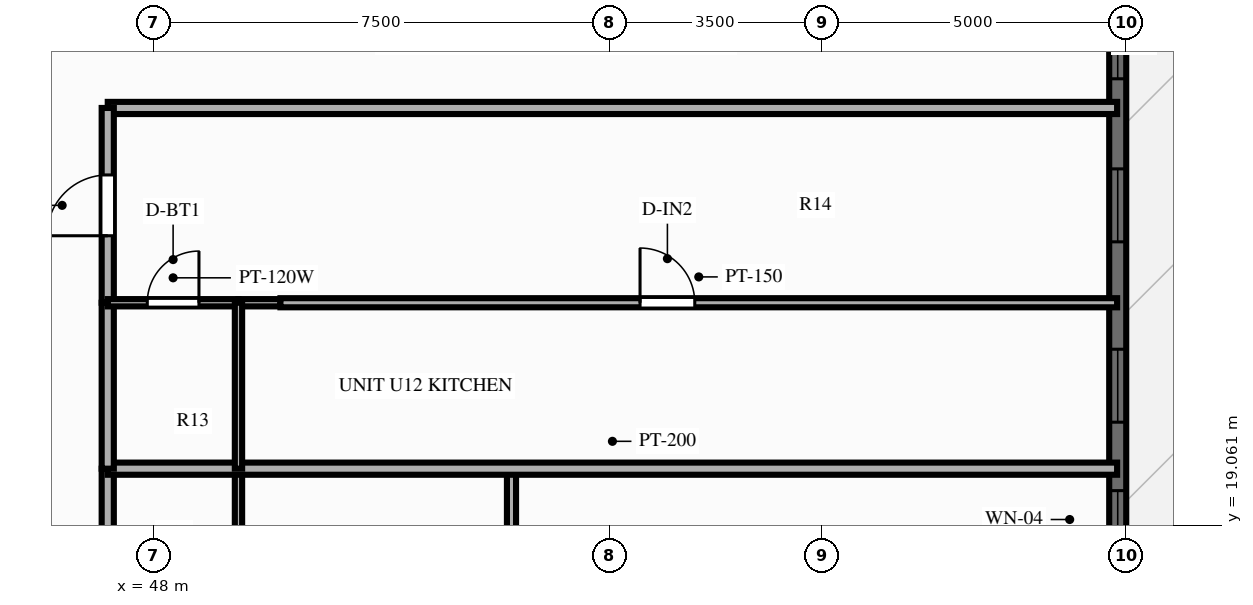
"""IFC4 building model, lengths in metres.
Left out: names, types, materials, properties, quantities, classifications, styles, units other than length and angle.
Written with IfcOpenShell. Run it as: python <this file> out.ifc"""

import sys

from ifc_helpers import new_model, si_unit, direction, frame, frame_2d, origin, place, context, subcontext, project, spatial, rectangle, extrude, source, transform, mapped, element, fill, save


model = new_model("IFC4")
c1 = context("Model", 3, precision=1e-05, world=origin(), true_north=direction((0.0, 1.0)))
c2 = subcontext(c1, "Body", "Model", "MODEL_VIEW")
j1 = project(units=[si_unit("LENGTHUNIT", "METRE"), si_unit("PLANEANGLEUNIT", "RADIAN")], contexts=[c1])
p1 = place(None, origin())
s1 = spatial("IfcSite", under=j1, at=p1, CompositionType="ELEMENT")
p2 = place(p1, origin())
s2 = spatial("IfcBuilding", under=s1, at=p2, CompositionType="ELEMENT")
p3 = place(p2, frame((0.0, 0.0, 113.85)))
s3 = spatial("IfcBuildingStorey", under=s2, at=p3, CompositionType="ELEMENT", Elevation=113.85)
p4 = place(p3, frame((63.86, 7.2, 0.0), z_axis=(0.0, 0.0, 1.0), x_axis=(0.0, 1.0, 0.0)))
e1 = element("IfcWall", 1, at=p4, inside=s3, PredefinedType="SOLIDWALL", context=c2, shape_type="SweptSolid", body=[
    extrude(rectangle(XDim=39.6, YDim=0.28, at=frame_2d((19.8, 0.0))), origin(), (0.0, 0.0, 1.0), 2.28),
])
p5 = place(p4, frame((1.56, 0.0, 0.25)))
e2 = element("IfcOpeningElement", 2, at=p5, cuts=e1, PredefinedType="OPENING", context=c2, shape_type="SweptSolid", body=[
    extrude(rectangle(XDim=1.2, YDim=1.5, at=frame_2d((0.6, 0.75))), frame((0.0, 0.152, 0.0), z_axis=(0.0, -1.0, 0.0), x_axis=(1.0, 0.0, 0.0)), (0.0, 0.0, 1.0), 0.304),
])
p6 = place(p4, frame((4.829, 0.0, 0.25)))
e3 = element("IfcOpeningElement", 3, at=p6, cuts=e1, PredefinedType="OPENING", context=c2, shape_type="SweptSolid", body=[
    extrude(rectangle(XDim=1.2, YDim=1.5, at=frame_2d((0.6, 0.75))), frame((0.0, 0.152, 0.0), z_axis=(0.0, -1.0, 0.0), x_axis=(1.0, 0.0, 0.0)), (0.0, 0.0, 1.0), 0.304),
])
p7 = place(p4, frame((7.567, 0.0, 0.25)))
e4 = element("IfcOpeningElement", 4, at=p7, cuts=e1, PredefinedType="OPENING", context=c2, shape_type="SweptSolid", body=[
    extrude(rectangle(XDim=1.2, YDim=1.5, at=frame_2d((0.6, 0.75))), frame((0.0, 0.152, 0.0), z_axis=(0.0, -1.0, 0.0), x_axis=(1.0, 0.0, 0.0)), (0.0, 0.0, 1.0), 0.304),
])
p8 = place(p4, frame((11.476, 0.0, 0.25)))
e5 = element("IfcOpeningElement", 5, at=p8, cuts=e1, PredefinedType="OPENING", context=c2, shape_type="SweptSolid", body=[
    extrude(rectangle(XDim=0.95, YDim=1.5, at=frame_2d((0.475, 0.75))), frame((0.0, 0.152, 0.0), z_axis=(0.0, -1.0, 0.0), x_axis=(1.0, 0.0, 0.0)), (0.0, 0.0, 1.0), 0.304),
])
p9 = place(p4, frame((13.552, 0.0, 0.25)))
e6 = element("IfcOpeningElement", 6, at=p9, cuts=e1, PredefinedType="OPENING", context=c2, shape_type="SweptSolid", body=[
    extrude(rectangle(XDim=1.2, YDim=1.5, at=frame_2d((0.6, 0.75))), frame((0.0, 0.152, 0.0), z_axis=(0.0, -1.0, 0.0), x_axis=(1.0, 0.0, 0.0)), (0.0, 0.0, 1.0), 0.304),
])
p10 = place(p4, frame((16.518, 0.0, 0.25)))
e7 = element("IfcOpeningElement", 7, at=p10, cuts=e1, PredefinedType="OPENING", context=c2, shape_type="SweptSolid", body=[
    extrude(rectangle(XDim=1.2, YDim=1.5, at=frame_2d((0.6, 0.75))), frame((0.0, 0.152, 0.0), z_axis=(0.0, -1.0, 0.0), x_axis=(1.0, 0.0, 0.0)), (0.0, 0.0, 1.0), 0.304),
])
p11 = place(p4, frame((19.2, 0.0, 0.25)))
e8 = element("IfcOpeningElement", 8, at=p11, cuts=e1, PredefinedType="OPENING", context=c2, shape_type="SweptSolid", body=[
    extrude(rectangle(XDim=1.2, YDim=1.5, at=frame_2d((0.6, 0.75))), frame((0.0, 0.152, 0.0), z_axis=(0.0, -1.0, 0.0), x_axis=(1.0, 0.0, 0.0)), (0.0, 0.0, 1.0), 0.304),
])
p12 = place(p4, frame((21.578, 0.0, 0.25)))
e9 = element("IfcOpeningElement", 9, at=p12, cuts=e1, PredefinedType="OPENING", context=c2, shape_type="SweptSolid", body=[
    extrude(rectangle(XDim=1.2, YDim=1.5, at=frame_2d((0.6, 0.75))), frame((0.0, 0.152, 0.0), z_axis=(0.0, -1.0, 0.0), x_axis=(1.0, 0.0, 0.0)), (0.0, 0.0, 1.0), 0.304),
])
p13 = place(p4, frame((26.313, 0.0, 0.0), z_axis=(0.0, 0.0, 1.0), x_axis=(-1.0, 0.0, 0.0)))
e10 = element("IfcOpeningElement", 10, at=p13, cuts=e1, PredefinedType="OPENING", context=c2, shape_type="SweptSolid", body=[
    extrude(rectangle(XDim=1.6, YDim=2.15, at=frame_2d((0.8, 1.075))), frame((0.0, 0.152, 0.0), z_axis=(0.0, -1.0, 0.0), x_axis=(1.0, 0.0, 0.0)), (0.0, 0.0, 1.0), 0.304),
])
p14 = place(p4, frame((29.305, 0.0, 0.25)))
e11 = element("IfcOpeningElement", 11, at=p14, cuts=e1, PredefinedType="OPENING", context=c2, shape_type="SweptSolid", body=[
    extrude(rectangle(XDim=0.7, YDim=1.5, at=frame_2d((0.35, 0.75))), frame((0.0, 0.152, 0.0), z_axis=(0.0, -1.0, 0.0), x_axis=(1.0, 0.0, 0.0)), (0.0, 0.0, 1.0), 0.304),
])
p15 = place(p4, frame((30.848, 0.0, 0.25)))
e12 = element("IfcOpeningElement", 12, at=p15, cuts=e1, PredefinedType="OPENING", context=c2, shape_type="SweptSolid", body=[
    extrude(rectangle(XDim=1.2, YDim=1.5, at=frame_2d((0.6, 0.75))), frame((0.0, 0.152, 0.0), z_axis=(0.0, -1.0, 0.0), x_axis=(1.0, 0.0, 0.0)), (0.0, 0.0, 1.0), 0.304),
])
p16 = place(p4, frame((34.183, 0.0, 0.25)))
e13 = element("IfcOpeningElement", 13, at=p16, cuts=e1, PredefinedType="OPENING", context=c2, shape_type="SweptSolid", body=[
    extrude(rectangle(XDim=1.2, YDim=1.5, at=frame_2d((0.6, 0.75))), frame((0.0, 0.152, 0.0), z_axis=(0.0, -1.0, 0.0), x_axis=(1.0, 0.0, 0.0)), (0.0, 0.0, 1.0), 0.304),
])
p17 = place(p4, frame((37.452, 0.0, 0.25)))
e14 = element("IfcOpeningElement", 14, at=p17, cuts=e1, PredefinedType="OPENING", context=c2, shape_type="SweptSolid", body=[
    extrude(rectangle(XDim=1.2, YDim=1.5, at=frame_2d((0.6, 0.75))), frame((0.0, 0.152, 0.0), z_axis=(0.0, -1.0, 0.0), x_axis=(1.0, 0.0, 0.0)), (0.0, 0.0, 1.0), 0.304),
])
p18 = place(p3, frame((47.25, 25.92, 0.0), z_axis=(0.0, 0.0, 1.0), x_axis=(1.0, 0.0, 0.0)))
e15 = element("IfcWall", 15, at=p18, inside=s3, PredefinedType="PARTITIONING", context=c2, shape_type="SweptSolid", body=[
    extrude(rectangle(XDim=16.6, YDim=0.2, at=frame_2d((8.3, 0.0))), origin(), (0.0, 0.0, 1.0), 2.79),
])
p19 = place(p3, frame((47.25, 16.68, 0.0), z_axis=(0.0, 0.0, 1.0), x_axis=(0.0, 1.0, 0.0)))
e16 = element("IfcWall", 16, at=p19, inside=s3, PredefinedType="PARTITIONING", context=c2, shape_type="SweptSolid", body=[
    extrude(rectangle(XDim=3.307, YDim=0.2, at=frame_2d((1.654, 0.0))), origin(), (0.0, 0.0, 1.0), 2.79),
])
p20 = place(p3, frame((49.4, 16.68, 0.0), z_axis=(0.0, 0.0, 1.0), x_axis=(0.0, 1.0, 0.0)))
e17 = element("IfcWall", 17, at=p20, inside=s3, PredefinedType="PARTITIONING", context=c2, shape_type="SweptSolid", body=[
    extrude(rectangle(XDim=3.307, YDim=0.12, at=frame_2d((1.654, 0.0))), origin(), (0.0, 0.0, 1.0), 2.79),
])
p21 = place(p3, frame((53.89, 16.68, 0.0), z_axis=(0.0, 0.0, 1.0), x_axis=(0.0, 1.0, 0.0)))
e18 = element("IfcWall", 18, at=p21, inside=s3, PredefinedType="PARTITIONING", context=c2, shape_type="SweptSolid", body=[
    extrude(rectangle(XDim=3.307, YDim=0.15, at=frame_2d((1.654, 0.0))), origin(), (0.0, 0.0, 1.0), 2.79),
])
p22 = place(p3, frame((47.25, 19.987, 0.0), z_axis=(0.0, 0.0, 1.0), x_axis=(1.0, 0.0, 0.0)))
e19 = element("IfcWall", 19, at=p22, inside=s3, PredefinedType="PARTITIONING", context=c2, shape_type="SweptSolid", body=[
    extrude(rectangle(XDim=16.6, YDim=0.2, at=frame_2d((8.3, 0.0))), origin(), (0.0, 0.0, 1.0), 2.79),
])
p23 = place(p3, frame((47.25, 19.987, 0.0), z_axis=(0.0, 0.0, 1.0), x_axis=(0.0, 1.0, 0.0)))
e20 = element("IfcWall", 20, at=p23, inside=s3, PredefinedType="PARTITIONING", context=c2, shape_type="SweptSolid", body=[
    extrude(rectangle(XDim=2.729, YDim=0.2, at=frame_2d((1.365, 0.0))), origin(), (0.0, 0.0, 1.0), 2.79),
])
p24 = place(p3, frame((47.25, 22.716, 0.0), z_axis=(0.0, 0.0, 1.0), x_axis=(0.0, 1.0, 0.0)))
e21 = element("IfcWall", 21, at=p24, inside=s3, PredefinedType="PARTITIONING", context=c2, shape_type="SweptSolid", body=[
    extrude(rectangle(XDim=3.204, YDim=0.2, at=frame_2d((1.602, 0.0))), origin(), (0.0, 0.0, 1.0), 2.79),
])
p25 = place(p24, frame((1.102, 0.0, 0.0)))
e22 = element("IfcOpeningElement", 22, at=p25, cuts=e21, PredefinedType="OPENING", context=c2, shape_type="SweptSolid", body=[
    extrude(rectangle(XDim=1.0, YDim=2.15, at=frame_2d((0.5, 1.075))), frame((0.0, 0.112, 0.0), z_axis=(0.0, -1.0, 0.0), x_axis=(1.0, 0.0, 0.0)), (0.0, 0.0, 1.0), 0.224),
])
p26 = place(p3, frame((47.25, 22.716, 0.0), z_axis=(0.0, 0.0, 1.0), x_axis=(1.0, 0.0, 0.0)))
e23 = element("IfcWall", 23, at=p26, inside=s3, PredefinedType="PARTITIONING", context=c2, shape_type="SweptSolid", body=[
    extrude(rectangle(XDim=2.15, YDim=0.12, at=frame_2d((1.075, 0.0))), origin(), (0.0, 0.0, 1.0), 2.79),
])
p27 = place(p26, frame((0.65, 0.0, 0.0)))
e24 = element("IfcOpeningElement", 24, at=p27, cuts=e23, PredefinedType="OPENING", context=c2, shape_type="SweptSolid", body=[
    extrude(rectangle(XDim=0.85, YDim=2.05, at=frame_2d((0.425, 1.025))), frame((0.0, 0.072, 0.0), z_axis=(0.0, -1.0, 0.0), x_axis=(1.0, 0.0, 0.0)), (0.0, 0.0, 1.0), 0.144),
])
p28 = place(p3, frame((49.4, 22.716, 0.0), z_axis=(0.0, 0.0, 1.0), x_axis=(1.0, 0.0, 0.0)))
e25 = element("IfcWall", 25, at=p28, inside=s3, PredefinedType="PARTITIONING", context=c2, shape_type="SweptSolid", body=[
    extrude(rectangle(XDim=0.69, YDim=0.12, at=frame_2d((0.345, 0.0))), origin(), (0.0, 0.0, 1.0), 2.79),
])
p29 = place(p3, frame((49.4, 19.987, 0.0), z_axis=(0.0, 0.0, 1.0), x_axis=(0.0, 1.0, 0.0)))
e26 = element("IfcWall", 26, at=p29, inside=s3, PredefinedType="PARTITIONING", context=c2, shape_type="SweptSolid", body=[
    extrude(rectangle(XDim=2.729, YDim=0.12, at=frame_2d((1.365, 0.0))), origin(), (0.0, 0.0, 1.0), 2.79),
])
p30 = place(p3, frame((50.09, 22.716, 0.0), z_axis=(0.0, 0.0, 1.0), x_axis=(1.0, 0.0, 0.0)))
e27 = element("IfcWall", 27, at=p30, inside=s3, PredefinedType="PARTITIONING", context=c2, shape_type="SweptSolid", body=[
    extrude(rectangle(XDim=13.76, YDim=0.15, at=frame_2d((6.88, 0.0))), origin(), (0.0, 0.0, 1.0), 2.79),
])
p31 = place(p30, frame((5.914, 0.0, 0.0)))
e28 = element("IfcOpeningElement", 28, at=p31, cuts=e27, PredefinedType="OPENING", context=c2, shape_type="SweptSolid", body=[
    extrude(rectangle(XDim=0.9, YDim=2.1, at=frame_2d((0.45, 1.05))), frame((0.0, 0.087, 0.0), z_axis=(0.0, -1.0, 0.0), x_axis=(1.0, 0.0, 0.0)), (0.0, 0.0, 1.0), 0.174),
])
m1 = source(origin(), c2, "Body", "SweptSolid", [
    extrude(rectangle(XDim=0.95, YDim=1.5, at=frame_2d((0.475, 0.75))), frame((0.0, 0.03, 0.0), z_axis=(0.0, -1.0, 0.0), x_axis=(1.0, 0.0, 0.0)), (0.0, 0.0, 1.0), 0.06),
])
p32 = place(p8, origin())
e29 = element("IfcWindow", 29, at=p32, inside=s3, PartitioningType="SINGLE_PANEL", PredefinedType="WINDOW", context=c2, shape_type="MappedRepresentation", body=[
    mapped(m1, transform((0.0, 0.0, 0.0), scale=1.0)),
])
fill(e5, e29)
m2 = source(origin(), c2, "Body", "SweptSolid", [
    extrude(rectangle(XDim=1.2, YDim=1.5, at=frame_2d((0.6, 0.75))), frame((0.0, 0.03, 0.0), z_axis=(0.0, -1.0, 0.0), x_axis=(1.0, 0.0, 0.0)), (0.0, 0.0, 1.0), 0.06),
])
p33 = place(p9, origin())
e30 = element("IfcWindow", 30, at=p33, inside=s3, PartitioningType="SINGLE_PANEL", PredefinedType="WINDOW", context=c2, shape_type="MappedRepresentation", body=[
    mapped(m2, transform((0.0, 0.0, 0.0), scale=1.0)),
])
fill(e6, e30)
p34 = place(p10, origin())
e31 = element("IfcWindow", 31, at=p34, inside=s3, PartitioningType="SINGLE_PANEL", PredefinedType="WINDOW", context=c2, shape_type="MappedRepresentation", body=[
    mapped(m2, transform((0.0, 0.0, 0.0), scale=1.0)),
])
fill(e7, e31)
p35 = place(p11, origin())
e32 = element("IfcWindow", 32, at=p35, inside=s3, PartitioningType="SINGLE_PANEL", PredefinedType="WINDOW", context=c2, shape_type="MappedRepresentation", body=[
    mapped(m2, transform((0.0, 0.0, 0.0), scale=1.0)),
])
fill(e8, e32)
m3 = source(origin(), c2, "Body", "SweptSolid", [
    extrude(rectangle(XDim=1.0, YDim=2.15, at=frame_2d((0.5, 1.075))), frame((0.0, 0.025, 0.0), z_axis=(0.0, -1.0, 0.0), x_axis=(1.0, 0.0, 0.0)), (0.0, 0.0, 1.0), 0.05),
])
p36 = place(p25, origin())
e33 = element("IfcDoor", 33, at=p36, inside=s3, OperationType="SINGLE_SWING_LEFT", PredefinedType="DOOR", context=c2, shape_type="MappedRepresentation", body=[
    mapped(m3, transform((0.0, 0.0, 0.0), scale=1.0)),
])
fill(e22, e33)
m4 = source(origin(), c2, "Body", "SweptSolid", [
    extrude(rectangle(XDim=0.85, YDim=2.05, at=frame_2d((0.425, 1.025))), frame((0.0, 0.025, 0.0), z_axis=(0.0, -1.0, 0.0), x_axis=(1.0, 0.0, 0.0)), (0.0, 0.0, 1.0), 0.05),
])
p37 = place(p27, origin())
e34 = element("IfcDoor", 34, at=p37, inside=s3, OperationType="SINGLE_SWING_RIGHT", PredefinedType="DOOR", context=c2, shape_type="MappedRepresentation", body=[
    mapped(m4, transform((0.0, 0.0, 0.0), scale=1.0)),
])
fill(e24, e34)
m5 = source(origin(), c2, "Body", "SweptSolid", [
    extrude(rectangle(XDim=0.9, YDim=2.1, at=frame_2d((0.45, 1.05))), frame((0.0, 0.025, 0.0), z_axis=(0.0, -1.0, 0.0), x_axis=(1.0, 0.0, 0.0)), (0.0, 0.0, 1.0), 0.05),
])
p38 = place(p31, origin())
e35 = element("IfcDoor", 35, at=p38, inside=s3, OperationType="SINGLE_SWING_LEFT", PredefinedType="DOOR", context=c2, shape_type="MappedRepresentation", body=[
    mapped(m5, transform((0.0, 0.0, 0.0), scale=1.0)),
])
fill(e28, e35)
save(model, sys.argv[1])
